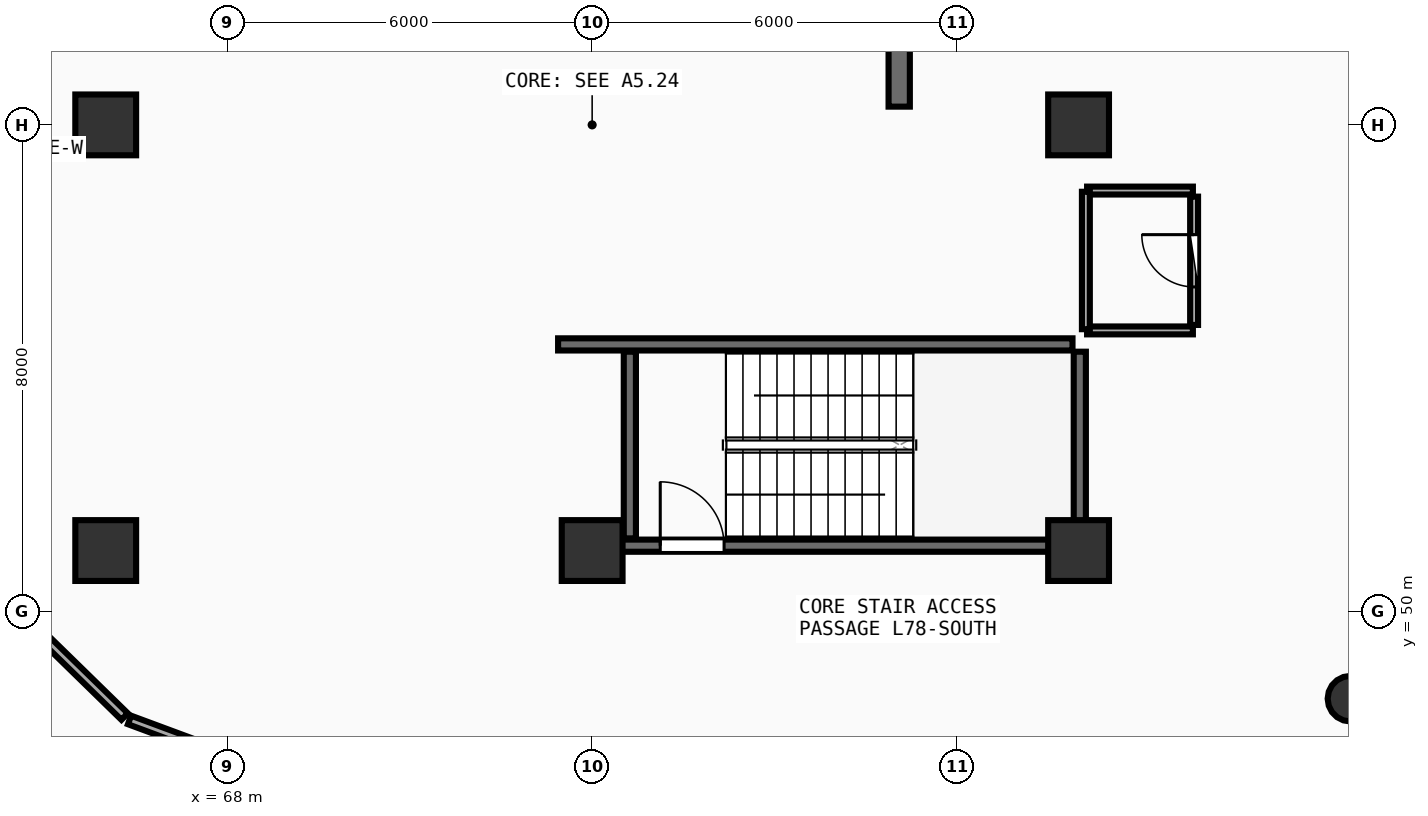
"""IFC4 building model, lengths in metres.
Left out: names, types, materials, properties, quantities, classifications, styles, units other than length and angle.
Written with IfcOpenShell. Run it as: python <this file> out.ifc"""

import sys

from ifc_helpers import new_model, si_unit, direction, frame, frame_2d, origin, origin_2d, place, context, subcontext, project, spatial, rectangle, circle, extrude, element, fill, save


model = new_model("IFC4")
c1 = context("Model", 3, precision=1e-05, world=origin(), true_north=direction((0.0, 1.0)))
c2 = subcontext(c1, "Body", "Model", "MODEL_VIEW")
j1 = project(units=[si_unit("LENGTHUNIT", "METRE"), si_unit("PLANEANGLEUNIT", "RADIAN")], contexts=[c1])
p1 = place(None, origin())
s1 = spatial("IfcSite", under=j1, at=p1, CompositionType="ELEMENT")
p2 = place(p1, origin())
s2 = spatial("IfcBuilding", under=s1, at=p2, CompositionType="ELEMENT")
p3 = place(p2, frame((0.0, 0.0, 306.9)))
s3 = spatial("IfcBuildingStorey", under=s2, at=p3, CompositionType="ELEMENT", Elevation=306.9)
for number, where, z_axis, x_axis in (
    (1, (66.0, 51.0, 0.0), (0.0, 0.0, 1.0), (1.0, 0.0, 0.0)),
    (2, (74.0, 51.0, 0.0), (0.0, 0.0, 1.0), (1.0, 0.0, 0.0)),
    (3, (82.0, 51.0, 0.0), (0.0, 0.0, 1.0), (1.0, 0.0, 0.0)),
    (4, (82.0, 58.0, 0.0), (0.0, 0.0, 1.0), (1.0, 0.0, 0.0)),
    (5, (66.0, 58.0, 0.0), (0.0, 0.0, 1.0), (1.0, 0.0, 0.0)),
):
    element("IfcColumn", number, at=place(p3, frame(where, z_axis=z_axis, x_axis=x_axis)), inside=s3, PredefinedType="PILASTER", context=c2, shape_type="SweptSolid", body=[
        extrude(rectangle(XDim=1.0, YDim=1.0, at=origin_2d()), origin(), (0.0, 0.0, 1.0), 4.2),
    ])
p4 = place(p3, frame((86.471, 48.564, 0.0), z_axis=(0.0, 0.0, 1.0), x_axis=(1.0, 0.0, 0.0)))
e6 = element("IfcColumn", 6, at=p4, inside=s3, PredefinedType="COLUMN", context=c2, shape_type="SweptSolid", body=[
    extrude(circle(Radius=0.375, at=origin_2d()), origin(), (0.0, 0.0, 1.0), 4.2),
])
p5 = place(p3, frame((74.0, 51.08, 0.0), z_axis=(0.0, 0.0, 1.0), x_axis=(1.0, 0.0, 0.0)))
e7 = element("IfcWall", 7, at=p5, inside=s3, PredefinedType="SHEAR", context=c2, shape_type="SweptSolid", body=[
    extrude(rectangle(XDim=7.9, YDim=0.2, at=frame_2d((3.95, 0.0))), origin(), (0.0, 0.0, 1.0), 3.92),
])
p6 = place(p5, frame((1.12, 0.0, 0.0)))
e8 = element("IfcOpeningElement", 8, at=p6, cuts=e7, PredefinedType="OPENING", context=c2, shape_type="SweptSolid", body=[
    extrude(rectangle(XDim=1.05, YDim=2.1, at=frame_2d((0.525, 1.05))), frame((0.0, 0.11, 0.0), z_axis=(0.0, -1.0, 0.0), x_axis=(1.0, 0.0, 0.0)), (0.0, 0.0, 1.0), 0.22),
])
p7 = place(p3, frame((82.02, 51.2, 0.0), z_axis=(0.0, 0.0, 1.0), x_axis=(0.0, 1.0, 0.0)))
e9 = element("IfcWall", 9, at=p7, inside=s3, PredefinedType="SHEAR", context=c2, shape_type="SweptSolid", body=[
    extrude(rectangle(XDim=3.07, YDim=0.2, at=frame_2d((1.535, 0.0))), origin(), (0.0, 0.0, 1.0), 3.92),
])
p8 = place(p3, frame((81.9, 54.39, 0.0), z_axis=(0.0, 0.0, 1.0), x_axis=(-1.0, 0.0, 0.0)))
e10 = element("IfcWall", 10, at=p8, inside=s3, PredefinedType="SHEAR", context=c2, shape_type="SweptSolid", body=[
    extrude(rectangle(XDim=8.46, YDim=0.2, at=frame_2d((4.23, 0.0))), origin(), (0.0, 0.0, 1.0), 3.92),
])
p9 = place(p3, frame((74.62, 54.27, 0.0), z_axis=(0.0, 0.0, 1.0), x_axis=(0.0, -1.0, 0.0)))
e11 = element("IfcWall", 11, at=p9, inside=s3, PredefinedType="SHEAR", context=c2, shape_type="SweptSolid", body=[
    extrude(rectangle(XDim=3.07, YDim=0.2, at=frame_2d((1.535, 0.0))), origin(), (0.0, 0.0, 1.0), 3.92),
])
p10 = place(p3, frame((79.05, 58.3, 0.0), z_axis=(0.0, 0.0, 1.0), x_axis=(0.0, 1.0, 0.0)))
e12 = element("IfcWall", 12, at=p10, inside=s3, PredefinedType="SHEAR", context=c2, shape_type="SweptSolid", body=[
    extrude(rectangle(XDim=6.3, YDim=0.35, at=frame_2d((3.15, 0.0))), origin(), (0.0, 0.0, 1.0), 3.98),
])
p11 = place(p3, frame((62.499, 51.993, 0.0), z_axis=(0.0, 0.0, 1.0), x_axis=(0.71541878573, -0.698695900249, 0.0)))
e13 = element("IfcWall", 13, at=p11, inside=s3, PredefinedType="PARTITIONING", context=c2, shape_type="SweptSolid", body=[
    extrude(rectangle(XDim=5.329, YDim=0.15, at=frame_2d((2.664, 0.0))), origin(), (0.0, 0.0, 1.0), 3.565),
])
p12 = place(p11, frame((1.824, 0.0, 0.0)))
e14 = element("IfcOpeningElement", 14, at=p12, cuts=e13, PredefinedType="OPENING", context=c2, shape_type="SweptSolid", body=[
    extrude(rectangle(XDim=1.08, YDim=2.1, at=frame_2d((0.54, 1.05))), frame((0.0, 0.085, 0.0), z_axis=(0.0, -1.0, 0.0), x_axis=(1.0, 0.0, 0.0)), (0.0, 0.0, 1.0), 0.17),
])
p13 = place(p3, frame((83.9, 54.71, 0.0), z_axis=(0.0, 0.0, 1.0), x_axis=(0.0, 1.0, 0.0)))
e15 = element("IfcWall", 15, at=p13, inside=s3, PredefinedType="PLUMBINGWALL", context=c2, shape_type="SweptSolid", body=[
    extrude(rectangle(XDim=2.11, YDim=0.13, at=frame_2d((1.055, 0.0))), origin(), (0.0, 0.0, 1.0), 3.97),
])
p14 = place(p13, frame((0.625, 0.0, 0.0)))
e16 = element("IfcOpeningElement", 16, at=p14, cuts=e15, PredefinedType="OPENING", context=c2, shape_type="SweptSolid", body=[
    extrude(rectangle(XDim=0.86, YDim=2.05, at=frame_2d((0.43, 1.025))), frame((0.0, 0.075, 0.0), z_axis=(0.0, -1.0, 0.0), x_axis=(1.0, 0.0, 0.0)), (0.0, 0.0, 1.0), 0.15),
])
p15 = place(p3, frame((66.392, 48.214, 0.0), z_axis=(0.0, 0.0, 1.0), x_axis=(0.937597367655, -0.347722843894, 0.0)))
e17 = element("IfcWall", 17, at=p15, inside=s3, PredefinedType="PARTITIONING", context=c2, shape_type="SweptSolid", body=[
    extrude(rectangle(XDim=5.606, YDim=0.15, at=frame_2d((2.803, 0.0))), origin(), (0.0, 0.0, 1.0), 3.665),
])
for number, where, z_axis, x_axis in (
    (18, (82.14, 54.62, 0.0), (0.0, 0.0, 1.0), (1.0, 0.0, 0.0)),
    (19, (83.88, 56.92, 0.0), (0.0, 0.0, 1.0), (-1.0, 0.0, 0.0)),
):
    element("IfcWall", number, at=place(p3, frame(where, z_axis=z_axis, x_axis=x_axis)), inside=s3, PredefinedType="PLUMBINGWALL", context=c2, shape_type="SweptSolid", body=[
        extrude(rectangle(XDim=1.74, YDim=0.13, at=frame_2d((0.87, 0.0))), origin(), (0.0, 0.0, 1.0), 3.265),
    ])
p16 = place(p3, frame((82.12, 56.9, 0.0), z_axis=(0.0, 0.0, 1.0), x_axis=(0.0, -1.0, 0.0)))
e20 = element("IfcWall", 20, at=p16, inside=s3, PredefinedType="PLUMBINGWALL", context=c2, shape_type="SweptSolid", body=[
    extrude(rectangle(XDim=2.26, YDim=0.13, at=frame_2d((1.13, 0.0))), origin(), (0.0, 0.0, 1.0), 3.265),
])
p17 = place(p6, origin())
e21 = element("IfcDoor", 21, at=p17, inside=s3, OperationType="SINGLE_SWING_LEFT", PredefinedType="DOOR", context=c2, shape_type="SweptSolid", body=[
    extrude(rectangle(XDim=1.05, YDim=2.1, at=frame_2d((0.525, 1.05))), frame((0.0, 0.025, 0.0), z_axis=(0.0, -1.0, 0.0), x_axis=(1.0, 0.0, 0.0)), (0.0, 0.0, 1.0), 0.05),
])
fill(e8, e21)
p18 = place(p14, origin())
e22 = element("IfcDoor", 22, at=p18, inside=s3, OperationType="SINGLE_SWING_RIGHT", PredefinedType="DOOR", context=c2, shape_type="SweptSolid", body=[
    extrude(rectangle(XDim=0.86, YDim=2.05, at=frame_2d((0.43, 1.025))), frame((0.0, 0.025, 0.0), z_axis=(0.0, -1.0, 0.0), x_axis=(1.0, 0.0, 0.0)), (0.0, 0.0, 1.0), 0.05),
])
fill(e16, e22)
save(model, sys.argv[1])
